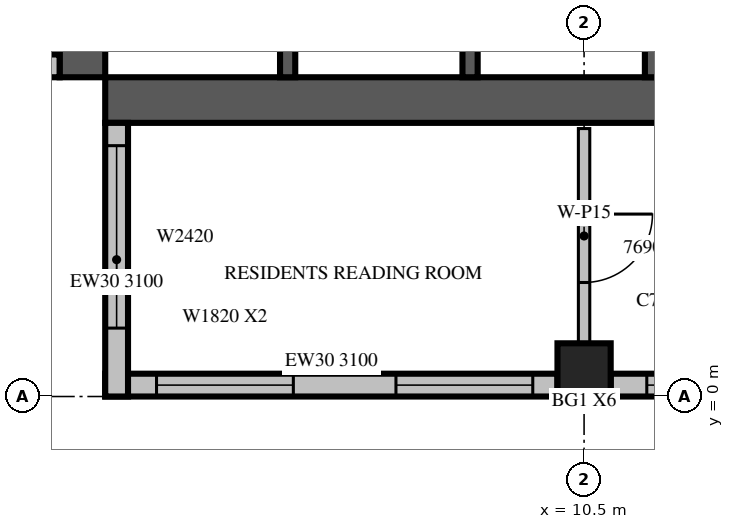
"""IFC4 building model, lengths in metres.
Left out: names, types, materials, properties, quantities, classifications, styles, units other than length and angle.
Written with IfcOpenShell. Run it as: python <this file> out.ifc"""

import sys

from ifc_helpers import new_model, si_unit, direction, frame, frame_2d, origin, origin_2d, place, context, subcontext, project, spatial, rectangle, extrude, source, transform, mapped, element, fill, save


model = new_model("IFC4")
c1 = context("Model", 3, precision=1e-05, world=origin(), true_north=direction((0.0, 1.0)))
c2 = subcontext(c1, "Body", "Model", "MODEL_VIEW")
j1 = project(units=[si_unit("LENGTHUNIT", "METRE"), si_unit("PLANEANGLEUNIT", "RADIAN")], contexts=[c1])
p1 = place(None, origin())
s1 = spatial("IfcSite", under=j1, at=p1, CompositionType="ELEMENT")
p2 = place(p1, origin())
s2 = spatial("IfcBuilding", under=s1, at=p2, CompositionType="ELEMENT")
p3 = place(p2, frame((0.0, 0.0, 302.0)))
s3 = spatial("IfcBuildingStorey", under=s2, at=p3, CompositionType="ELEMENT", Elevation=302.0)
m1 = source(origin(), c2, "Body", "SweptSolid", [
    extrude(rectangle(XDim=0.7, YDim=0.7, at=origin_2d()), origin(), (0.0, 0.0, 1.0), 3.5),
])
p4 = place(p3, frame((10.5, 0.35, 0.0), z_axis=(0.0, 0.0, 1.0), x_axis=(1.0, 0.0, 0.0)))
e1 = element("IfcColumn", 1, at=p4, inside=s3, PredefinedType="COLUMN", context=c2, shape_type="MappedRepresentation", body=[
    mapped(m1, transform((0.0, 0.0, 0.0), scale=1.0)),
])
m2 = source(origin(), c2, "Body", "SweptSolid", [
    extrude(rectangle(XDim=17.4, YDim=0.6, at=frame_2d((8.7, 0.0))), origin(), (0.0, 0.0, 1.0), 3.5),
])
p5 = place(p3, frame((3.9, 4.2, 0.0), z_axis=(0.0, 0.0, 1.0), x_axis=(0.0, 1.0, 0.0)))
e2 = element("IfcWall", 2, at=p5, inside=s3, PredefinedType="SHEAR", context=c2, shape_type="MappedRepresentation", body=[
    mapped(m2, transform((0.0, 0.0, 0.0), scale=1.0)),
])
m3 = source(origin(), c2, "Body", "SweptSolid", [
    extrude(rectangle(XDim=2.2, YDim=2.1, at=frame_2d((1.1, 1.05))), frame((0.0, 0.31, 0.0), z_axis=(0.0, -1.0, 0.0), x_axis=(1.0, 0.0, 0.0)), (0.0, 0.0, 1.0), 0.62),
])
p6 = place(p5, frame((4.2, 0.0, 0.0)))
e3 = element("IfcOpeningElement", 3, at=p6, cuts=e2, PredefinedType="OPENING", context=c2, shape_type="MappedRepresentation", body=[
    mapped(m3, transform((0.0, 0.0, 0.0), scale=1.0)),
])
m4 = source(origin(), c2, "Body", "SweptSolid", [
    extrude(rectangle(XDim=0.9, YDim=2.1, at=frame_2d((0.45, 1.05))), frame((0.0, 0.31, 0.0), z_axis=(0.0, -1.0, 0.0), x_axis=(1.0, 0.0, 0.0)), (0.0, 0.0, 1.0), 0.62),
])
p7 = place(p5, frame((10.95, 0.0, 0.0)))
e4 = element("IfcOpeningElement", 4, at=p7, cuts=e2, PredefinedType="OPENING", context=c2, shape_type="MappedRepresentation", body=[
    mapped(m4, transform((0.0, 0.0, 0.0), scale=1.0)),
])
p8 = place(p3, frame((4.2, 3.9, 0.0), z_axis=(0.0, 0.0, 1.0), x_axis=(1.0, 0.0, 0.0)))
e5 = element("IfcWall", 5, at=p8, inside=s3, PredefinedType="SHEAR", context=c2, shape_type="MappedRepresentation", body=[
    mapped(m2, transform((0.0, 0.0, 0.0), scale=1.0)),
])
p9 = place(p8, frame((12.8, 0.0, 0.0)))
e6 = element("IfcOpeningElement", 6, at=p9, cuts=e5, PredefinedType="OPENING", context=c2, shape_type="MappedRepresentation", body=[
    mapped(m4, transform((0.0, 0.0, 0.0), scale=1.0)),
])
m5 = source(origin(), c2, "Body", "SweptSolid", [
    extrude(rectangle(XDim=5.95, YDim=0.3, at=frame_2d((2.975, 0.0))), origin(), (0.0, 0.0, 1.0), 3.1),
])
p10 = place(p3, frame((4.2, 0.15, 0.0), z_axis=(0.0, 0.0, 1.0), x_axis=(1.0, 0.0, 0.0)))
e7 = element("IfcWall", 7, at=p10, inside=s3, PredefinedType="STANDARD", context=c2, shape_type="MappedRepresentation", body=[
    mapped(m5, transform((0.0, 0.0, 0.0), scale=1.0)),
])
m6 = source(origin(), c2, "Body", "SweptSolid", [
    extrude(rectangle(XDim=1.8, YDim=2.0, at=frame_2d((0.9, 1.0))), frame((0.0, 0.16, 0.0), z_axis=(0.0, -1.0, 0.0), x_axis=(1.0, 0.0, 0.0)), (0.0, 0.0, 1.0), 0.32),
])
p11 = place(p10, frame((0.675, 0.0, 0.6)))
e8 = element("IfcOpeningElement", 8, at=p11, cuts=e7, PredefinedType="OPENING", context=c2, shape_type="MappedRepresentation", body=[
    mapped(m6, transform((0.0, 0.0, 0.0), scale=1.0)),
])
p12 = place(p10, frame((3.825, 0.0, 0.6)))
e9 = element("IfcOpeningElement", 9, at=p12, cuts=e7, PredefinedType="OPENING", context=c2, shape_type="MappedRepresentation", body=[
    mapped(m6, transform((0.0, 0.0, 0.0), scale=1.0)),
])
m7 = source(origin(), c2, "Body", "SweptSolid", [
    extrude(rectangle(XDim=9.45, YDim=0.3, at=frame_2d((4.725, 0.0))), origin(), (0.0, 0.0, 1.0), 3.1),
])
p13 = place(p3, frame((10.85, 0.15, 0.0), z_axis=(0.0, 0.0, 1.0), x_axis=(1.0, 0.0, 0.0)))
e10 = element("IfcWall", 10, at=p13, inside=s3, PredefinedType="STANDARD", context=c2, shape_type="MappedRepresentation", body=[
    mapped(m7, transform((0.0, 0.0, 0.0), scale=1.0)),
])
m8 = source(origin(), c2, "Body", "SweptSolid", [
    extrude(rectangle(XDim=3.6, YDim=2.0, at=frame_2d((1.8, 1.0))), frame((0.0, 0.16, 0.0), z_axis=(0.0, -1.0, 0.0), x_axis=(1.0, 0.0, 0.0)), (0.0, 0.0, 1.0), 0.32),
])
p14 = place(p13, frame((0.475, 0.0, 0.6)))
e11 = element("IfcOpeningElement", 11, at=p14, cuts=e10, PredefinedType="OPENING", context=c2, shape_type="MappedRepresentation", body=[
    mapped(m8, transform((0.0, 0.0, 0.0), scale=1.0)),
])
m9 = source(origin(), c2, "Body", "SweptSolid", [
    extrude(rectangle(XDim=3.0, YDim=2.0, at=frame_2d((1.5, 1.0))), frame((0.0, 0.16, 0.0), z_axis=(0.0, -1.0, 0.0), x_axis=(1.0, 0.0, 0.0)), (0.0, 0.0, 1.0), 0.32),
])
p15 = place(p13, frame((6.025, 0.0, 0.6)))
e12 = element("IfcOpeningElement", 12, at=p15, cuts=e10, PredefinedType="OPENING", context=c2, shape_type="MappedRepresentation", body=[
    mapped(m9, transform((0.0, 0.0, 0.0), scale=1.0)),
])
m10 = source(origin(), c2, "Body", "SweptSolid", [
    extrude(rectangle(XDim=3.6, YDim=0.3, at=frame_2d((1.8, 0.0))), origin(), (0.0, 0.0, 1.0), 3.1),
])
p16 = place(p3, frame((0.0, 4.35, 0.0), z_axis=(0.0, 0.0, 1.0), x_axis=(1.0, 0.0, 0.0)))
e13 = element("IfcWall", 13, at=p16, inside=s3, PredefinedType="STANDARD", context=c2, shape_type="MappedRepresentation", body=[
    mapped(m10, transform((0.0, 0.0, 0.0), scale=1.0)),
])
m11 = source(origin(), c2, "Body", "SweptSolid", [
    extrude(rectangle(XDim=2.4, YDim=2.0, at=frame_2d((1.2, 1.0))), frame((0.0, 0.16, 0.0), z_axis=(0.0, -1.0, 0.0), x_axis=(1.0, 0.0, 0.0)), (0.0, 0.0, 1.0), 0.32),
])
p17 = place(p16, frame((0.9, 0.0, 0.6)))
e14 = element("IfcOpeningElement", 14, at=p17, cuts=e13, PredefinedType="OPENING", context=c2, shape_type="MappedRepresentation", body=[
    mapped(m11, transform((0.0, 0.0, 0.0), scale=1.0)),
])
p18 = place(p3, frame((4.35, 3.6, 0.0), z_axis=(0.0, 0.0, 1.0), x_axis=(0.0, -1.0, 0.0)))
e15 = element("IfcWall", 15, at=p18, inside=s3, PredefinedType="STANDARD", context=c2, shape_type="MappedRepresentation", body=[
    mapped(m10, transform((0.0, 0.0, 0.0), scale=1.0)),
])
p19 = place(p18, frame((0.3, 0.0, 0.6)))
e16 = element("IfcOpeningElement", 16, at=p19, cuts=e15, PredefinedType="OPENING", context=c2, shape_type="MappedRepresentation", body=[
    mapped(m11, transform((0.0, 0.0, 0.0), scale=1.0)),
])
m12 = source(origin(), c2, "Body", "SweptSolid", [
    extrude(rectangle(XDim=3.1, YDim=0.2, at=frame_2d((1.55, 0.0))), origin(), (0.0, 0.0, 1.0), 3.5),
])
for number, where, z_axis, x_axis in (
    (17, (6.6, 4.2, 0.0), (0.0, 0.0, 1.0), (0.0, 1.0, 0.0)),
    (18, (9.0, 4.2, 0.0), (0.0, 0.0, 1.0), (0.0, 1.0, 0.0)),
    (19, (11.4, 4.2, 0.0), (0.0, 0.0, 1.0), (0.0, 1.0, 0.0)),
):
    element("IfcWall", number, at=place(p3, frame(where, z_axis=z_axis, x_axis=x_axis)), inside=s3, PredefinedType="SOLIDWALL", context=c2, shape_type="MappedRepresentation", body=[
        mapped(m12, transform((0.0, 0.0, 0.0), scale=1.0)),
    ])
m13 = source(origin(), c2, "Body", "SweptSolid", [
    extrude(rectangle(XDim=2.826, YDim=0.15, at=frame_2d((1.413, 0.0))), origin(), (0.0, 0.0, 1.0), 3.1),
])
p20 = place(p3, frame((10.5, 3.525, 0.0), z_axis=(0.0, 0.0, 1.0), x_axis=(0.0, -1.0, 0.0)))
e20 = element("IfcWall", 20, at=p20, inside=s3, PredefinedType="PARTITIONING", context=c2, shape_type="MappedRepresentation", body=[
    mapped(m13, transform((0.0, 0.0, 0.0), scale=1.0)),
])
m14 = source(origin(), c2, "Body", "SweptSolid", [
    extrude(rectangle(XDim=0.9, YDim=2.1, at=frame_2d((0.45, 1.05))), frame((0.0, 0.085, 0.0), z_axis=(0.0, -1.0, 0.0), x_axis=(1.0, 0.0, 0.0)), (0.0, 0.0, 1.0), 0.17),
])
p21 = place(p20, frame((1.125, 0.0, 0.0)))
e21 = element("IfcOpeningElement", 21, at=p21, cuts=e20, PredefinedType="OPENING", context=c2, shape_type="MappedRepresentation", body=[
    mapped(m14, transform((0.0, 0.0, 0.0), scale=1.0)),
])
m15 = source(origin(), c2, "Body", "SweptSolid", [
    extrude(rectangle(XDim=1.8, YDim=2.0, at=frame_2d((0.9, 1.0))), frame((0.0, 0.03, 0.0), z_axis=(0.0, -1.0, 0.0), x_axis=(1.0, 0.0, 0.0)), (0.0, 0.0, 1.0), 0.06),
])
p22 = place(p11, origin())
e22 = element("IfcWindow", 22, at=p22, inside=s3, PartitioningType="SINGLE_PANEL", PredefinedType="WINDOW", context=c2, shape_type="MappedRepresentation", body=[
    mapped(m15, transform((0.0, 0.0, 0.0), scale=1.0)),
])
fill(e8, e22)
p23 = place(p12, origin())
e23 = element("IfcWindow", 23, at=p23, inside=s3, PartitioningType="SINGLE_PANEL", PredefinedType="WINDOW", context=c2, shape_type="MappedRepresentation", body=[
    mapped(m15, transform((0.0, 0.0, 0.0), scale=1.0)),
])
fill(e9, e23)
m16 = source(origin(), c2, "Body", "SweptSolid", [
    extrude(rectangle(XDim=3.6, YDim=2.0, at=frame_2d((1.8, 1.0))), frame((0.0, 0.03, 0.0), z_axis=(0.0, -1.0, 0.0), x_axis=(1.0, 0.0, 0.0)), (0.0, 0.0, 1.0), 0.06),
])
p24 = place(p14, origin())
e24 = element("IfcWindow", 24, at=p24, inside=s3, PartitioningType="SINGLE_PANEL", PredefinedType="WINDOW", context=c2, shape_type="MappedRepresentation", body=[
    mapped(m16, transform((0.0, 0.0, 0.0), scale=1.0)),
])
fill(e11, e24)
m17 = source(origin(), c2, "Body", "SweptSolid", [
    extrude(rectangle(XDim=2.4, YDim=2.0, at=frame_2d((1.2, 1.0))), frame((0.0, 0.03, 0.0), z_axis=(0.0, -1.0, 0.0), x_axis=(1.0, 0.0, 0.0)), (0.0, 0.0, 1.0), 0.06),
])
p25 = place(p19, origin())
e25 = element("IfcWindow", 25, at=p25, inside=s3, PartitioningType="SINGLE_PANEL", PredefinedType="WINDOW", context=c2, shape_type="MappedRepresentation", body=[
    mapped(m17, transform((0.0, 0.0, 0.0), scale=1.0)),
])
fill(e16, e25)
m18 = source(origin(), c2, "Body", "SweptSolid", [
    extrude(rectangle(XDim=0.9, YDim=2.1, at=frame_2d((0.45, 1.05))), frame((0.0, 0.025, 0.0), z_axis=(0.0, -1.0, 0.0), x_axis=(1.0, 0.0, 0.0)), (0.0, 0.0, 1.0), 0.05),
])
p26 = place(p21, origin())
e26 = element("IfcDoor", 26, at=p26, inside=s3, OperationType="SINGLE_SWING_LEFT", PredefinedType="DOOR", context=c2, shape_type="MappedRepresentation", body=[
    mapped(m18, transform((0.0, 0.0, 0.0), scale=1.0)),
])
fill(e21, e26)
save(model, sys.argv[1])
